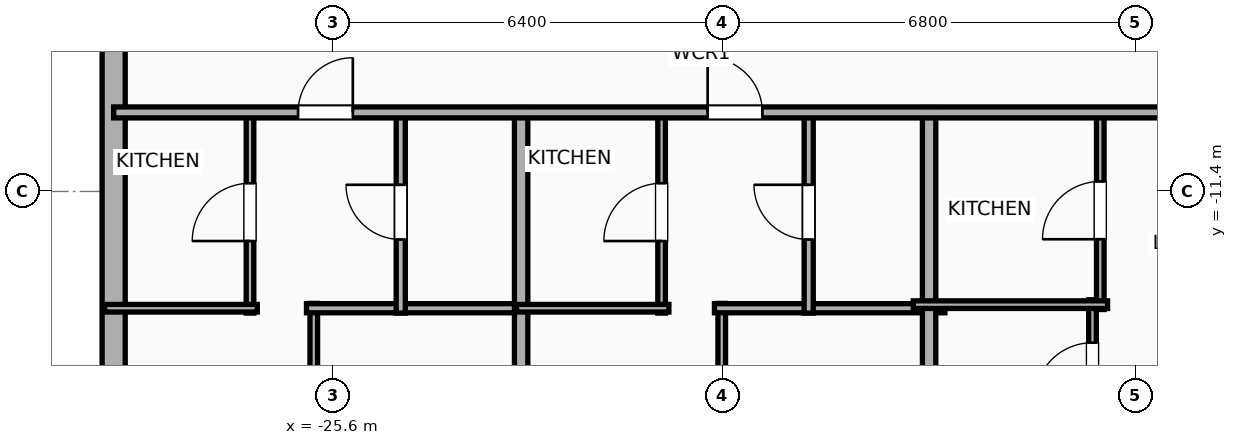
"""IFC4 building model, lengths in metres.
Left out: names, types, materials, properties, quantities, classifications, styles, units other than length and angle.
Written with IfcOpenShell. Run it as: python <this file> out.ifc"""

import sys

from ifc_helpers import new_model, si_unit, direction, frame, frame_2d, origin, place, context, subcontext, project, spatial, rectangle, extrude, element, fill, save


model = new_model("IFC4")
c1 = context("Model", 3, precision=1e-05, world=origin(), true_north=direction((0.0, 1.0)))
c2 = subcontext(c1, "Body", "Model", "MODEL_VIEW")
j1 = project(units=[si_unit("LENGTHUNIT", "METRE"), si_unit("PLANEANGLEUNIT", "RADIAN")], contexts=[c1])
p1 = place(None, origin())
s1 = spatial("IfcSite", under=j1, at=p1, CompositionType="ELEMENT")
p2 = place(p1, origin())
s2 = spatial("IfcBuilding", under=s1, at=p2, CompositionType="ELEMENT")
p3 = place(p2, frame((0.0, 0.0, 105.3)))
s3 = spatial("IfcBuildingStorey", under=s2, at=p3, CompositionType="ELEMENT", Elevation=105.3)
p4 = place(p3, frame((-29.21, -16.581, 0.0), z_axis=(0.0, 0.0, 1.0), x_axis=(0.0, 1.0, 0.0)))
e1 = element("IfcWall", 1, at=p4, inside=s3, PredefinedType="ELEMENTEDWALL", context=c2, shape_type="SweptSolid", body=[
    extrude(rectangle(XDim=34.363, YDim=0.38, at=frame_2d((17.181, 0.0))), origin(), (0.0, 0.0, 1.0), 3.65),
])
p5 = place(p4, frame((31.087, 0.0, 0.75)))
e2 = element("IfcOpeningElement", 2, at=p5, cuts=e1, PredefinedType="OPENING", context=c2, shape_type="SweptSolid", body=[
    extrude(rectangle(XDim=1.2, YDim=2.05, at=frame_2d((0.6, 1.025))), frame((0.0, 0.2, 0.0), z_axis=(0.0, -1.0, 0.0), x_axis=(1.0, 0.0, 0.0)), (0.0, 0.0, 1.0), 0.4),
])
p6 = place(p4, frame((21.626, 0.0, 0.75)))
e3 = element("IfcOpeningElement", 3, at=p6, cuts=e1, PredefinedType="OPENING", context=c2, shape_type="SweptSolid", body=[
    extrude(rectangle(XDim=1.2, YDim=2.05, at=frame_2d((0.6, 1.025))), frame((0.0, 0.2, 0.0), z_axis=(0.0, -1.0, 0.0), x_axis=(1.0, 0.0, 0.0)), (0.0, 0.0, 1.0), 0.4),
])
p7 = place(p4, frame((10.551, 0.0, 0.75)))
e4 = element("IfcOpeningElement", 4, at=p7, cuts=e1, PredefinedType="OPENING", context=c2, shape_type="SweptSolid", body=[
    extrude(rectangle(XDim=1.2, YDim=2.05, at=frame_2d((0.6, 1.025))), frame((0.0, 0.2, 0.0), z_axis=(0.0, -1.0, 0.0), x_axis=(1.0, 0.0, 0.0)), (0.0, 0.0, 1.0), 0.4),
])
p8 = place(p3, frame((-25.919, -20.456, 0.0), z_axis=(0.0, 0.0, 1.0), x_axis=(0.0, 1.0, 0.0)))
e5 = element("IfcWall", 5, at=p8, inside=s3, PredefinedType="PARTITIONING", context=c2, shape_type="SweptSolid", body=[
    extrude(rectangle(XDim=7.216, YDim=0.125, at=frame_2d((3.608, 0.0))), origin(), (0.0, 0.0, 1.0), 3.65),
])
p9 = place(p8, frame((5.034, 0.0, 0.0)))
e6 = element("IfcOpeningElement", 6, at=p9, cuts=e5, PredefinedType="OPENING", context=c2, shape_type="SweptSolid", body=[
    extrude(rectangle(XDim=0.9, YDim=2.05, at=frame_2d((0.45, 1.025))), frame((0.0, 0.073, 0.0), z_axis=(0.0, -1.0, 0.0), x_axis=(1.0, 0.0, 0.0)), (0.0, 0.0, 1.0), 0.145),
])
p10 = place(p3, frame((-26.039, -13.32, 0.0), z_axis=(0.0, 0.0, 1.0), x_axis=(1.0, 0.0, 0.0)))
e7 = element("IfcWall", 7, at=p10, inside=s3, PredefinedType="PLUMBINGWALL", context=c2, shape_type="SweptSolid", body=[
    extrude(rectangle(XDim=3.605, YDim=0.15, at=frame_2d((1.802, 0.0))), origin(), (0.0, 0.0, 1.0), 3.65),
])
p11 = place(p3, frame((-26.968, -13.4, 0.0), z_axis=(0.0, 0.0, 1.0), x_axis=(0.0, 1.0, 0.0)))
e8 = element("IfcWall", 8, at=p11, inside=s3, PredefinedType="PARTITIONING", context=c2, shape_type="SweptSolid", body=[
    extrude(rectangle(XDim=3.32, YDim=0.125, at=frame_2d((1.66, 0.0))), origin(), (0.0, 0.0, 1.0), 3.65),
])
p12 = place(p11, frame((1.185, 0.0, 0.0)))
e9 = element("IfcOpeningElement", 9, at=p12, cuts=e8, PredefinedType="OPENING", context=c2, shape_type="SweptSolid", body=[
    extrude(rectangle(XDim=0.95, YDim=2.05, at=frame_2d((0.475, 1.025))), frame((0.0, 0.073, 0.0), z_axis=(0.0, -1.0, 0.0), x_axis=(1.0, 0.0, 0.0)), (0.0, 0.0, 1.0), 0.145),
])
p13 = place(p3, frame((-29.36, -13.32, 0.0), z_axis=(0.0, 0.0, 1.0), x_axis=(1.0, 0.0, 0.0)))
e10 = element("IfcWall", 10, at=p13, inside=s3, PredefinedType="PARTITIONING", context=c2, shape_type="SweptSolid", body=[
    extrude(rectangle(XDim=2.512, YDim=0.125, at=frame_2d((1.256, 0.0))), origin(), (0.0, 0.0, 1.0), 3.65),
])
p14 = place(p3, frame((-24.489, -13.4, 0.0), z_axis=(0.0, 0.0, 1.0), x_axis=(0.0, 1.0, 0.0)))
e11 = element("IfcWall", 11, at=p14, inside=s3, PredefinedType="PLUMBINGWALL", context=c2, shape_type="SweptSolid", body=[
    extrude(rectangle(XDim=3.32, YDim=0.15, at=frame_2d((1.66, 0.0))), origin(), (0.0, 0.0, 1.0), 3.65),
])
p15 = place(p14, frame((1.21, 0.0, 0.0)))
e12 = element("IfcOpeningElement", 12, at=p15, cuts=e11, PredefinedType="OPENING", context=c2, shape_type="SweptSolid", body=[
    extrude(rectangle(XDim=0.9, YDim=2.05, at=frame_2d((0.45, 1.025))), frame((0.0, 0.085, 0.0), z_axis=(0.0, -1.0, 0.0), x_axis=(1.0, 0.0, 0.0)), (0.0, 0.0, 1.0), 0.17),
])
p16 = place(p3, frame((-22.509, -20.41, 0.0), z_axis=(0.0, 0.0, 1.0), x_axis=(0.0, 1.0, 0.0)))
e13 = element("IfcWall", 13, at=p16, inside=s3, PredefinedType="PARTITIONING", context=c2, shape_type="SweptSolid", body=[
    extrude(rectangle(XDim=10.39, YDim=0.22, at=frame_2d((5.195, 0.0))), origin(), (0.0, 0.0, 1.0), 3.65),
])
p17 = place(p3, frame((-19.21, -20.56, 0.0), z_axis=(0.0, 0.0, 1.0), x_axis=(0.0, 1.0, 0.0)))
e14 = element("IfcWall", 14, at=p17, inside=s3, PredefinedType="PARTITIONING", context=c2, shape_type="SweptSolid", body=[
    extrude(rectangle(XDim=7.32, YDim=0.125, at=frame_2d((3.66, 0.0))), origin(), (0.0, 0.0, 1.0), 3.65),
])
p18 = place(p17, frame((5.113, 0.0, 0.0)))
e15 = element("IfcOpeningElement", 15, at=p18, cuts=e14, PredefinedType="OPENING", context=c2, shape_type="SweptSolid", body=[
    extrude(rectangle(XDim=0.9, YDim=2.05, at=frame_2d((0.45, 1.025))), frame((0.0, 0.073, 0.0), z_axis=(0.0, -1.0, 0.0), x_axis=(1.0, 0.0, 0.0)), (0.0, 0.0, 1.0), 0.145),
])
p19 = place(p3, frame((-19.33, -13.32, 0.0), z_axis=(0.0, 0.0, 1.0), x_axis=(1.0, 0.0, 0.0)))
e16 = element("IfcWall", 16, at=p19, inside=s3, PredefinedType="PLUMBINGWALL", context=c2, shape_type="SweptSolid", body=[
    extrude(rectangle(XDim=3.79, YDim=0.15, at=frame_2d((1.895, 0.0))), origin(), (0.0, 0.0, 1.0), 3.65),
])
p20 = place(p3, frame((-20.199, -13.4, 0.0), z_axis=(0.0, 0.0, 1.0), x_axis=(0.0, 1.0, 0.0)))
e17 = element("IfcWall", 17, at=p20, inside=s3, PredefinedType="PARTITIONING", context=c2, shape_type="SweptSolid", body=[
    extrude(rectangle(XDim=3.32, YDim=0.125, at=frame_2d((1.66, 0.0))), origin(), (0.0, 0.0, 1.0), 3.65),
])
p21 = place(p20, frame((1.185, 0.0, 0.0)))
e18 = element("IfcOpeningElement", 18, at=p21, cuts=e17, PredefinedType="OPENING", context=c2, shape_type="SweptSolid", body=[
    extrude(rectangle(XDim=0.95, YDim=2.05, at=frame_2d((0.475, 1.025))), frame((0.0, 0.073, 0.0), z_axis=(0.0, -1.0, 0.0), x_axis=(1.0, 0.0, 0.0)), (0.0, 0.0, 1.0), 0.145),
])
p22 = place(p3, frame((-22.584, -13.32, 0.0), z_axis=(0.0, 0.0, 1.0), x_axis=(1.0, 0.0, 0.0)))
e19 = element("IfcWall", 19, at=p22, inside=s3, PredefinedType="PARTITIONING", context=c2, shape_type="SweptSolid", body=[
    extrude(rectangle(XDim=2.505, YDim=0.125, at=frame_2d((1.252, 0.0))), origin(), (0.0, 0.0, 1.0), 3.65),
])
p23 = place(p3, frame((-17.78, -13.4, 0.0), z_axis=(0.0, 0.0, 1.0), x_axis=(0.0, 1.0, 0.0)))
e20 = element("IfcWall", 20, at=p23, inside=s3, PredefinedType="PLUMBINGWALL", context=c2, shape_type="SweptSolid", body=[
    extrude(rectangle(XDim=3.32, YDim=0.15, at=frame_2d((1.66, 0.0))), origin(), (0.0, 0.0, 1.0), 3.65),
])
p24 = place(p23, frame((1.21, 0.0, 0.0)))
e21 = element("IfcOpeningElement", 21, at=p24, cuts=e20, PredefinedType="OPENING", context=c2, shape_type="SweptSolid", body=[
    extrude(rectangle(XDim=0.9, YDim=2.05, at=frame_2d((0.45, 1.025))), frame((0.0, 0.085, 0.0), z_axis=(0.0, -1.0, 0.0), x_axis=(1.0, 0.0, 0.0)), (0.0, 0.0, 1.0), 0.17),
])
p25 = place(p3, frame((-15.8, -20.41, 0.0), z_axis=(0.0, 0.0, 1.0), x_axis=(0.0, 1.0, 0.0)))
e22 = element("IfcWall", 22, at=p25, inside=s3, PredefinedType="PARTITIONING", context=c2, shape_type="SweptSolid", body=[
    extrude(rectangle(XDim=10.39, YDim=0.22, at=frame_2d((5.195, 0.0))), origin(), (0.0, 0.0, 1.0), 3.65),
])
p26 = place(p3, frame((-13.113, -20.56, 0.0), z_axis=(0.0, 0.0, 1.0), x_axis=(0.0, 1.0, 0.0)))
e23 = element("IfcWall", 23, at=p26, inside=s3, PredefinedType="PARTITIONING", context=c2, shape_type="SweptSolid", body=[
    extrude(rectangle(XDim=7.379, YDim=0.125, at=frame_2d((3.689, 0.0))), origin(), (0.0, 0.0, 1.0), 3.65),
])
p27 = place(p26, frame((5.723, 0.0, 0.0)))
e24 = element("IfcOpeningElement", 24, at=p27, cuts=e23, PredefinedType="OPENING", context=c2, shape_type="SweptSolid", body=[
    extrude(rectangle(XDim=0.95, YDim=2.05, at=frame_2d((0.475, 1.025))), frame((0.0, 0.073, 0.0), z_axis=(0.0, -1.0, 0.0), x_axis=(1.0, 0.0, 0.0)), (0.0, 0.0, 1.0), 0.145),
])
p28 = place(p3, frame((-12.985, -13.341, 0.0), z_axis=(0.0, 0.0, 1.0), x_axis=(0.0, 1.0, 0.0)))
e25 = element("IfcWall", 25, at=p28, inside=s3, PredefinedType="PARTITIONING", context=c2, shape_type="SweptSolid", body=[
    extrude(rectangle(XDim=3.261, YDim=0.125, at=frame_2d((1.63, 0.0))), origin(), (0.0, 0.0, 1.0), 3.65),
])
p29 = place(p28, frame((1.156, 0.0, 0.0)))
e26 = element("IfcOpeningElement", 26, at=p29, cuts=e25, PredefinedType="OPENING", context=c2, shape_type="SweptSolid", body=[
    extrude(rectangle(XDim=0.95, YDim=2.05, at=frame_2d((0.475, 1.025))), frame((0.0, 0.073, 0.0), z_axis=(0.0, -1.0, 0.0), x_axis=(1.0, 0.0, 0.0)), (0.0, 0.0, 1.0), 0.145),
])
p30 = place(p3, frame((-16.06, -13.261, 0.0), z_axis=(0.0, 0.0, 1.0), x_axis=(1.0, 0.0, 0.0)))
e27 = element("IfcWall", 27, at=p30, inside=s3, PredefinedType="PARTITIONING", context=c2, shape_type="SweptSolid", body=[
    extrude(rectangle(XDim=3.195, YDim=0.125, at=frame_2d((1.598, 0.0))), origin(), (0.0, 0.0, 1.0), 3.65),
])
p31 = place(p3, frame((-29.21, -10.1, 0.0), z_axis=(0.0, 0.0, 1.0), x_axis=(1.0, 0.0, 0.0)))
e28 = element("IfcWall", 28, at=p31, inside=s3, PredefinedType="PARTITIONING", context=c2, shape_type="SweptSolid", body=[
    extrude(rectangle(XDim=62.42, YDim=0.18, at=frame_2d((31.21, 0.0))), origin(), (0.0, 0.0, 1.0), 3.65),
])
p32 = place(p31, frame((3.033, 0.0, 0.0)))
e29 = element("IfcOpeningElement", 29, at=p32, cuts=e28, PredefinedType="OPENING", context=c2, shape_type="SweptSolid", body=[
    extrude(rectangle(XDim=0.9, YDim=2.05, at=frame_2d((0.45, 1.025))), frame((0.0, 0.1, 0.0), z_axis=(0.0, -1.0, 0.0), x_axis=(1.0, 0.0, 0.0)), (0.0, 0.0, 1.0), 0.2),
])
p33 = place(p31, frame((9.768, 0.0, 0.0)))
e30 = element("IfcOpeningElement", 30, at=p33, cuts=e28, PredefinedType="OPENING", context=c2, shape_type="SweptSolid", body=[
    extrude(rectangle(XDim=0.9, YDim=2.05, at=frame_2d((0.45, 1.025))), frame((0.0, 0.1, 0.0), z_axis=(0.0, -1.0, 0.0), x_axis=(1.0, 0.0, 0.0)), (0.0, 0.0, 1.0), 0.2),
])
p34 = place(p31, frame((18.65, 0.0, 0.0)))
e31 = element("IfcOpeningElement", 31, at=p34, cuts=e28, PredefinedType="OPENING", context=c2, shape_type="SweptSolid", body=[
    extrude(rectangle(XDim=1.15, YDim=2.05, at=frame_2d((0.575, 1.025))), frame((0.0, 0.1, 0.0), z_axis=(0.0, -1.0, 0.0), x_axis=(1.0, 0.0, 0.0)), (0.0, 0.0, 1.0), 0.2),
])
p35 = place(p31, frame((29.212, 0.0, 0.0)))
e32 = element("IfcOpeningElement", 32, at=p35, cuts=e28, PredefinedType="OPENING", context=c2, shape_type="SweptSolid", body=[
    extrude(rectangle(XDim=1.15, YDim=2.05, at=frame_2d((0.575, 1.025))), frame((0.0, 0.1, 0.0), z_axis=(0.0, -1.0, 0.0), x_axis=(1.0, 0.0, 0.0)), (0.0, 0.0, 1.0), 0.2),
])
p36 = place(p31, frame((40.379, 0.0, 0.0)))
e33 = element("IfcOpeningElement", 33, at=p36, cuts=e28, PredefinedType="OPENING", context=c2, shape_type="SweptSolid", body=[
    extrude(rectangle(XDim=1.15, YDim=2.05, at=frame_2d((0.575, 1.025))), frame((0.0, 0.1, 0.0), z_axis=(0.0, -1.0, 0.0), x_axis=(1.0, 0.0, 0.0)), (0.0, 0.0, 1.0), 0.2),
])
p37 = place(p31, frame((50.959, 0.0, 0.0)))
e34 = element("IfcOpeningElement", 34, at=p37, cuts=e28, PredefinedType="OPENING", context=c2, shape_type="SweptSolid", body=[
    extrude(rectangle(XDim=1.15, YDim=2.05, at=frame_2d((0.575, 1.025))), frame((0.0, 0.1, 0.0), z_axis=(0.0, -1.0, 0.0), x_axis=(1.0, 0.0, 0.0)), (0.0, 0.0, 1.0), 0.2),
])
p38 = place(p31, frame((59.117, 0.0, 0.0)))
e35 = element("IfcOpeningElement", 35, at=p38, cuts=e28, PredefinedType="OPENING", context=c2, shape_type="SweptSolid", body=[
    extrude(rectangle(XDim=0.9, YDim=2.05, at=frame_2d((0.45, 1.025))), frame((0.0, 0.1, 0.0), z_axis=(0.0, -1.0, 0.0), x_axis=(1.0, 0.0, 0.0)), (0.0, 0.0, 1.0), 0.2),
])
p39 = place(p12, origin())
e36 = element("IfcDoor", 36, at=p39, inside=s3, OperationType="SINGLE_SWING_LEFT", PredefinedType="DOOR", context=c2, shape_type="SweptSolid", body=[
    extrude(rectangle(XDim=0.95, YDim=2.05, at=frame_2d((0.475, 1.025))), frame((0.0, 0.025, 0.0), z_axis=(0.0, -1.0, 0.0), x_axis=(1.0, 0.0, 0.0)), (0.0, 0.0, 1.0), 0.05),
])
fill(e9, e36)
p40 = place(p15, origin())
e37 = element("IfcDoor", 37, at=p40, inside=s3, OperationType="SINGLE_SWING_RIGHT", PredefinedType="DOOR", context=c2, shape_type="SweptSolid", body=[
    extrude(rectangle(XDim=0.9, YDim=2.05, at=frame_2d((0.45, 1.025))), frame((0.0, 0.025, 0.0), z_axis=(0.0, -1.0, 0.0), x_axis=(1.0, 0.0, 0.0)), (0.0, 0.0, 1.0), 0.05),
])
fill(e12, e37)
p41 = place(p21, origin())
e38 = element("IfcDoor", 38, at=p41, inside=s3, OperationType="SINGLE_SWING_LEFT", PredefinedType="DOOR", context=c2, shape_type="SweptSolid", body=[
    extrude(rectangle(XDim=0.95, YDim=2.05, at=frame_2d((0.475, 1.025))), frame((0.0, 0.025, 0.0), z_axis=(0.0, -1.0, 0.0), x_axis=(1.0, 0.0, 0.0)), (0.0, 0.0, 1.0), 0.05),
])
fill(e18, e38)
p42 = place(p24, origin())
e39 = element("IfcDoor", 39, at=p42, inside=s3, OperationType="SINGLE_SWING_RIGHT", PredefinedType="DOOR", context=c2, shape_type="SweptSolid", body=[
    extrude(rectangle(XDim=0.9, YDim=2.05, at=frame_2d((0.45, 1.025))), frame((0.0, 0.025, 0.0), z_axis=(0.0, -1.0, 0.0), x_axis=(1.0, 0.0, 0.0)), (0.0, 0.0, 1.0), 0.05),
])
fill(e21, e39)
p43 = place(p27, origin())
e40 = element("IfcDoor", 40, at=p43, inside=s3, OperationType="SINGLE_SWING_LEFT", PredefinedType="DOOR", context=c2, shape_type="SweptSolid", body=[
    extrude(rectangle(XDim=0.95, YDim=2.05, at=frame_2d((0.475, 1.025))), frame((0.0, 0.025, 0.0), z_axis=(0.0, -1.0, 0.0), x_axis=(1.0, 0.0, 0.0)), (0.0, 0.0, 1.0), 0.05),
])
fill(e24, e40)
p44 = place(p29, origin())
e41 = element("IfcDoor", 41, at=p44, inside=s3, OperationType="SINGLE_SWING_LEFT", PredefinedType="DOOR", context=c2, shape_type="SweptSolid", body=[
    extrude(rectangle(XDim=0.95, YDim=2.05, at=frame_2d((0.475, 1.025))), frame((0.0, 0.025, 0.0), z_axis=(0.0, -1.0, 0.0), x_axis=(1.0, 0.0, 0.0)), (0.0, 0.0, 1.0), 0.05),
])
fill(e26, e41)
p45 = place(p32, origin())
e42 = element("IfcDoor", 42, at=p45, inside=s3, OperationType="SINGLE_SWING_RIGHT", PredefinedType="DOOR", context=c2, shape_type="SweptSolid", body=[
    extrude(rectangle(XDim=0.9, YDim=2.05, at=frame_2d((0.45, 1.025))), frame((0.0, 0.025, 0.0), z_axis=(0.0, -1.0, 0.0), x_axis=(1.0, 0.0, 0.0)), (0.0, 0.0, 1.0), 0.05),
])
fill(e29, e42)
p46 = place(p33, origin())
e43 = element("IfcDoor", 43, at=p46, inside=s3, OperationType="SINGLE_SWING_LEFT", PredefinedType="DOOR", context=c2, shape_type="SweptSolid", body=[
    extrude(rectangle(XDim=0.9, YDim=2.05, at=frame_2d((0.45, 1.025))), frame((0.0, 0.025, 0.0), z_axis=(0.0, -1.0, 0.0), x_axis=(1.0, 0.0, 0.0)), (0.0, 0.0, 1.0), 0.05),
])
fill(e30, e43)
save(model, sys.argv[1])
